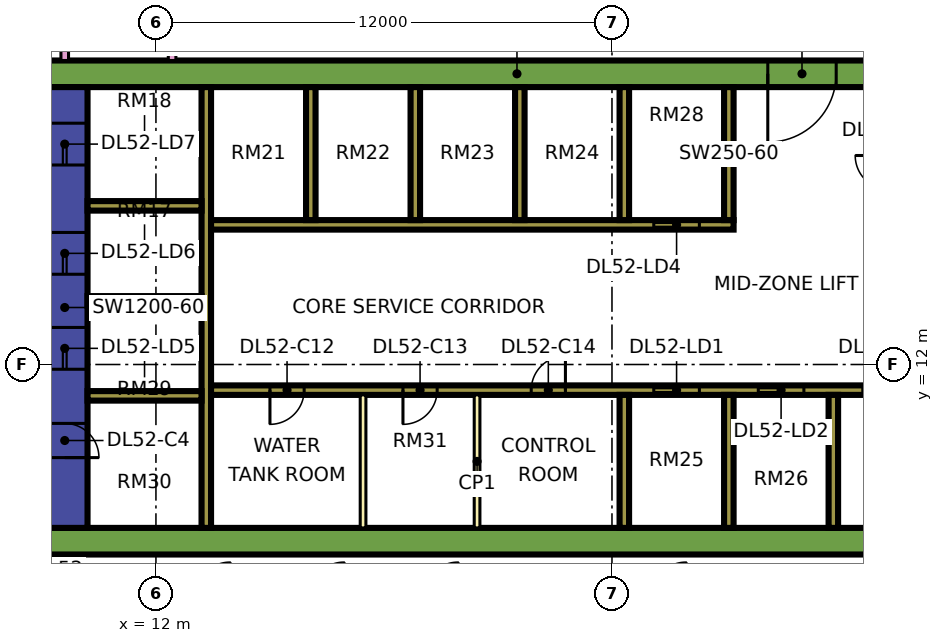
"""IFC4 building model, lengths in metres.
Left out: names, types, materials, properties, quantities, classifications, styles, units other than length and angle.
Written with IfcOpenShell. Run it as: python <this file> out.ifc"""

import sys

from ifc_helpers import new_model, si_unit, direction, frame, frame_2d, origin, place, context, subcontext, project, spatial, rectangle, extrude, element, fill, save


model = new_model("IFC4")
c1 = context("Model", 3, precision=1e-05, world=origin(), true_north=direction((0.0, 1.0)))
c2 = subcontext(c1, "Body", "Model", "MODEL_VIEW")
j1 = project(units=[si_unit("LENGTHUNIT", "METRE"), si_unit("PLANEANGLEUNIT", "RADIAN")], contexts=[c1])
p1 = place(None, origin())
s1 = spatial("IfcSite", under=j1, at=p1, CompositionType="ELEMENT")
p2 = place(p1, origin())
s2 = spatial("IfcBuilding", under=s1, at=p2, CompositionType="ELEMENT")
p3 = place(p2, frame((0.0, 0.0, 222.9)))
s3 = spatial("IfcBuildingStorey", under=s2, at=p3, CompositionType="ELEMENT", Elevation=222.9)
p4 = place(p3, frame((9.0, 7.35, 0.0), z_axis=(0.0, 0.0, 1.0), x_axis=(1.0, 0.0, 0.0)))
e1 = element("IfcWall", 1, at=p4, inside=s3, PredefinedType="SHEAR", context=c2, shape_type="SweptSolid", body=[
    extrude(rectangle(XDim=25.0, YDim=0.7, at=frame_2d((12.5, 0.0))), origin(), (0.0, 0.0, 1.0), 3.75),
])
p5 = place(p3, frame((9.0, 19.65, 0.0), z_axis=(0.0, 0.0, 1.0), x_axis=(1.0, 0.0, 0.0)))
e2 = element("IfcWall", 2, at=p5, inside=s3, PredefinedType="SHEAR", context=c2, shape_type="SweptSolid", body=[
    extrude(rectangle(XDim=25.0, YDim=0.7, at=frame_2d((12.5, 0.0))), origin(), (0.0, 0.0, 1.0), 3.75),
])
p6 = place(p5, frame((19.1, 0.0, 0.0)))
e3 = element("IfcOpeningElement", 3, at=p6, cuts=e2, PredefinedType="OPENING", context=c2, shape_type="SweptSolid", body=[
    extrude(rectangle(XDim=1.8, YDim=2.4, at=frame_2d((0.9, 1.2))), frame((0.0, 0.36, 0.0), z_axis=(0.0, -1.0, 0.0), x_axis=(1.0, 0.0, 0.0)), (0.0, 0.0, 1.0), 0.72),
])
p7 = place(p3, frame((9.6, 7.7, 0.0), z_axis=(0.0, 0.0, 1.0), x_axis=(0.0, 1.0, 0.0)))
e4 = element("IfcWall", 4, at=p7, inside=s3, PredefinedType="SHEAR", context=c2, shape_type="SweptSolid", body=[
    extrude(rectangle(XDim=11.6, YDim=1.2, at=frame_2d((5.8, 0.0))), origin(), (0.0, 0.0, 1.0), 3.75),
])
p8 = place(p7, frame((4.175, 0.0, 0.0)))
e5 = element("IfcOpeningElement", 5, at=p8, cuts=e4, PredefinedType="OPENING", context=c2, shape_type="SweptSolid", body=[
    extrude(rectangle(XDim=1.1, YDim=2.2, at=frame_2d((0.55, 1.1))), frame((0.0, 0.61, 0.0), z_axis=(0.0, -1.0, 0.0), x_axis=(1.0, 0.0, 0.0)), (0.0, 0.0, 1.0), 1.22),
])
p9 = place(p7, frame((6.675, 0.0, 0.0)))
e6 = element("IfcOpeningElement", 6, at=p9, cuts=e4, PredefinedType="OPENING", context=c2, shape_type="SweptSolid", body=[
    extrude(rectangle(XDim=1.1, YDim=2.2, at=frame_2d((0.55, 1.1))), frame((0.0, 0.61, 0.0), z_axis=(0.0, -1.0, 0.0), x_axis=(1.0, 0.0, 0.0)), (0.0, 0.0, 1.0), 1.22),
])
p10 = place(p7, frame((9.55, 0.0, 0.0)))
e7 = element("IfcOpeningElement", 7, at=p10, cuts=e4, PredefinedType="OPENING", context=c2, shape_type="SweptSolid", body=[
    extrude(rectangle(XDim=1.1, YDim=2.2, at=frame_2d((0.55, 1.1))), frame((0.0, 0.61, 0.0), z_axis=(0.0, -1.0, 0.0), x_axis=(1.0, 0.0, 0.0)), (0.0, 0.0, 1.0), 1.22),
])
p11 = place(p7, frame((1.85, 0.0, 0.0)))
e8 = element("IfcOpeningElement", 8, at=p11, cuts=e4, PredefinedType="OPENING", context=c2, shape_type="SweptSolid", body=[
    extrude(rectangle(XDim=0.9, YDim=2.1, at=frame_2d((0.45, 1.05))), frame((0.0, 0.61, 0.0), z_axis=(0.0, -1.0, 0.0), x_axis=(1.0, 0.0, 0.0)), (0.0, 0.0, 1.0), 1.22),
])
p12 = place(p3, frame((13.325, 7.7, 0.0), z_axis=(0.0, 0.0, 1.0), x_axis=(0.0, 1.0, 0.0)))
e9 = element("IfcWall", 9, at=p12, inside=s3, PredefinedType="SHEAR", context=c2, shape_type="SweptSolid", body=[
    extrude(rectangle(XDim=11.6, YDim=0.25, at=frame_2d((5.8, 0.0))), origin(), (0.0, 0.0, 1.0), 3.75),
])
p13 = place(p3, frame((13.45, 11.325, 0.0), z_axis=(0.0, 0.0, 1.0), x_axis=(1.0, 0.0, 0.0)))
e10 = element("IfcWall", 10, at=p13, inside=s3, PredefinedType="SHEAR", context=c2, shape_type="SweptSolid", body=[
    extrude(rectangle(XDim=19.85, YDim=0.25, at=frame_2d((9.925, 0.0))), origin(), (0.0, 0.0, 1.0), 3.75),
])
p14 = place(p13, frame((11.65, 0.0, 0.0)))
e11 = element("IfcOpeningElement", 11, at=p14, cuts=e10, PredefinedType="OPENING", context=c2, shape_type="SweptSolid", body=[
    extrude(rectangle(XDim=1.2, YDim=2.2, at=frame_2d((0.6, 1.1))), frame((0.0, 0.135, 0.0), z_axis=(0.0, -1.0, 0.0), x_axis=(1.0, 0.0, 0.0)), (0.0, 0.0, 1.0), 0.27),
])
p15 = place(p13, frame((14.4, 0.0, 0.0)))
e12 = element("IfcOpeningElement", 12, at=p15, cuts=e10, PredefinedType="OPENING", context=c2, shape_type="SweptSolid", body=[
    extrude(rectangle(XDim=1.2, YDim=2.2, at=frame_2d((0.6, 1.1))), frame((0.0, 0.135, 0.0), z_axis=(0.0, -1.0, 0.0), x_axis=(1.0, 0.0, 0.0)), (0.0, 0.0, 1.0), 0.27),
])
p16 = place(p13, frame((17.15, 0.0, 0.0)))
e13 = element("IfcOpeningElement", 13, at=p16, cuts=e10, PredefinedType="OPENING", context=c2, shape_type="SweptSolid", body=[
    extrude(rectangle(XDim=1.2, YDim=2.2, at=frame_2d((0.6, 1.1))), frame((0.0, 0.135, 0.0), z_axis=(0.0, -1.0, 0.0), x_axis=(1.0, 0.0, 0.0)), (0.0, 0.0, 1.0), 0.27),
])
p17 = place(p13, frame((1.55, 0.0, 0.0)))
e14 = element("IfcOpeningElement", 14, at=p17, cuts=e10, PredefinedType="OPENING", context=c2, shape_type="SweptSolid", body=[
    extrude(rectangle(XDim=0.9, YDim=2.1, at=frame_2d((0.45, 1.05))), frame((0.0, 0.135, 0.0), z_axis=(0.0, -1.0, 0.0), x_axis=(1.0, 0.0, 0.0)), (0.0, 0.0, 1.0), 0.27),
])
p18 = place(p13, frame((5.05, 0.0, 0.0)))
e15 = element("IfcOpeningElement", 15, at=p18, cuts=e10, PredefinedType="OPENING", context=c2, shape_type="SweptSolid", body=[
    extrude(rectangle(XDim=0.9, YDim=2.1, at=frame_2d((0.45, 1.05))), frame((0.0, 0.135, 0.0), z_axis=(0.0, -1.0, 0.0), x_axis=(1.0, 0.0, 0.0)), (0.0, 0.0, 1.0), 0.27),
])
p19 = place(p13, frame((8.425, 0.0, 0.0)))
e16 = element("IfcOpeningElement", 16, at=p19, cuts=e10, PredefinedType="OPENING", context=c2, shape_type="SweptSolid", body=[
    extrude(rectangle(XDim=0.9, YDim=2.1, at=frame_2d((0.45, 1.05))), frame((0.0, 0.135, 0.0), z_axis=(0.0, -1.0, 0.0), x_axis=(1.0, 0.0, 0.0)), (0.0, 0.0, 1.0), 0.27),
])
p20 = place(p3, frame((13.45, 15.675, 0.0), z_axis=(0.0, 0.0, 1.0), x_axis=(1.0, 0.0, 0.0)))
e17 = element("IfcWall", 17, at=p20, inside=s3, PredefinedType="SHEAR", context=c2, shape_type="SweptSolid", body=[
    extrude(rectangle(XDim=13.75, YDim=0.25, at=frame_2d((6.875, 0.0))), origin(), (0.0, 0.0, 1.0), 3.75),
])
p21 = place(p20, frame((11.65, 0.0, 0.0)))
e18 = element("IfcOpeningElement", 18, at=p21, cuts=e17, PredefinedType="OPENING", context=c2, shape_type="SweptSolid", body=[
    extrude(rectangle(XDim=1.2, YDim=2.2, at=frame_2d((0.6, 1.1))), frame((0.0, 0.135, 0.0), z_axis=(0.0, -1.0, 0.0), x_axis=(1.0, 0.0, 0.0)), (0.0, 0.0, 1.0), 0.27),
])
for number, where, z_axis, x_axis in (
    (19, (10.2, 11.175, 0.0), (0.0, 0.0, 1.0), (1.0, 0.0, 0.0)),
    (20, (10.2, 13.675, 0.0), (0.0, 0.0, 1.0), (1.0, 0.0, 0.0)),
    (21, (10.2, 16.175, 0.0), (0.0, 0.0, 1.0), (1.0, 0.0, 0.0)),
):
    element("IfcWall", number, at=place(p3, frame(where, z_axis=z_axis, x_axis=x_axis)), inside=s3, PredefinedType="SHEAR", context=c2, shape_type="SweptSolid", body=[
        extrude(rectangle(XDim=3.0, YDim=0.25, at=frame_2d((1.5, 0.0))), origin(), (0.0, 0.0, 1.0), 3.75),
    ])
for number, where, z_axis, x_axis in (
    (22, (24.325, 7.7, 0.0), (0.0, 0.0, 1.0), (0.0, 1.0, 0.0)),
    (23, (27.075, 7.7, 0.0), (0.0, 0.0, 1.0), (0.0, 1.0, 0.0)),
    (24, (29.825, 7.7, 0.0), (0.0, 0.0, 1.0), (0.0, 1.0, 0.0)),
    (25, (16.075, 15.8, 0.0), (0.0, 0.0, 1.0), (0.0, 1.0, 0.0)),
    (26, (18.825, 15.8, 0.0), (0.0, 0.0, 1.0), (0.0, 1.0, 0.0)),
    (27, (21.575, 15.8, 0.0), (0.0, 0.0, 1.0), (0.0, 1.0, 0.0)),
    (28, (24.325, 15.8, 0.0), (0.0, 0.0, 1.0), (0.0, 1.0, 0.0)),
    (29, (27.075, 15.8, 0.0), (0.0, 0.0, 1.0), (0.0, 1.0, 0.0)),
):
    element("IfcWall", number, at=place(p3, frame(where, z_axis=z_axis, x_axis=x_axis)), inside=s3, PredefinedType="SHEAR", context=c2, shape_type="SweptSolid", body=[
        extrude(rectangle(XDim=3.5, YDim=0.25, at=frame_2d((1.75, 0.0))), origin(), (0.0, 0.0, 1.0), 3.75),
    ])
p22 = place(p3, frame((-1.447, 12.553, 0.0), z_axis=(0.0, 0.0, 1.0), x_axis=(0.707106781187, -0.707106781187, 0.0)))
e30 = element("IfcWall", 30, at=p22, inside=s3, PredefinedType="SOLIDWALL", context=c2, shape_type="SweptSolid", body=[
    extrude(rectangle(XDim=19.799, YDim=0.15, at=frame_2d((9.899, 0.0))), origin(), (0.0, 0.0, 1.0), 3.35),
])
p23 = place(p22, frame((2.212, 0.0, 0.45)))
e31 = element("IfcOpeningElement", 31, at=p23, cuts=e30, PredefinedType="OPENING", context=c2, shape_type="SweptSolid", body=[
    extrude(rectangle(XDim=3.0, YDim=2.4, at=frame_2d((1.5, 1.2))), frame((0.0, 0.085, 0.0), z_axis=(0.0, -1.0, 0.0), x_axis=(1.0, 0.0, 0.0)), (0.0, 0.0, 1.0), 0.17),
])
p24 = place(p22, frame((10.216, 0.0, 0.45)))
e32 = element("IfcOpeningElement", 32, at=p24, cuts=e30, PredefinedType="OPENING", context=c2, shape_type="SweptSolid", body=[
    extrude(rectangle(XDim=3.0, YDim=2.4, at=frame_2d((1.5, 1.2))), frame((0.0, 0.085, 0.0), z_axis=(0.0, -1.0, 0.0), x_axis=(1.0, 0.0, 0.0)), (0.0, 0.0, 1.0), 0.17),
])
for number, where, z_axis, x_axis in (
    (33, (17.45, 7.7, 0.0), (0.0, 0.0, 1.0), (0.0, 1.0, 0.0)),
    (34, (20.45, 7.7, 0.0), (0.0, 0.0, 1.0), (0.0, 1.0, 0.0)),
):
    element("IfcWall", number, at=place(p3, frame(where, z_axis=z_axis, x_axis=x_axis)), inside=s3, PredefinedType="PARTITIONING", context=c2, shape_type="SweptSolid", body=[
        extrude(rectangle(XDim=3.5, YDim=0.15, at=frame_2d((1.75, 0.0))), origin(), (0.0, 0.0, 1.0), 3.35),
    ])
p25 = place(p3, frame((9.6, 20.0, 0.0), z_axis=(0.0, 0.0, 1.0), x_axis=(0.0, 1.0, 0.0)))
e35 = element("IfcWall", 35, at=p25, inside=s3, PredefinedType="PARTITIONING", context=c2, shape_type="SweptSolid", body=[
    extrude(rectangle(XDim=42.926, YDim=0.2, at=frame_2d((21.463, 0.0))), origin(), (0.0, 0.0, 1.0), 3.35),
])
p26 = place(p25, frame((17.1, 0.0, 0.0)))
e36 = element("IfcOpeningElement", 36, at=p26, cuts=e35, PredefinedType="OPENING", context=c2, shape_type="SweptSolid", body=[
    extrude(rectangle(XDim=1.0, YDim=2.1, at=frame_2d((0.5, 1.05))), frame((0.0, 0.11, 0.0), z_axis=(0.0, -1.0, 0.0), x_axis=(1.0, 0.0, 0.0)), (0.0, 0.0, 1.0), 0.22),
])
p27 = place(p25, frame((32.1, 0.0, 0.0)))
e37 = element("IfcOpeningElement", 37, at=p27, cuts=e35, PredefinedType="OPENING", context=c2, shape_type="SweptSolid", body=[
    extrude(rectangle(XDim=1.0, YDim=2.1, at=frame_2d((0.5, 1.05))), frame((0.0, 0.11, 0.0), z_axis=(0.0, -1.0, 0.0), x_axis=(1.0, 0.0, 0.0)), (0.0, 0.0, 1.0), 0.22),
])
p28 = place(p25, frame((0.6, 0.0, 0.0)))
e38 = element("IfcOpeningElement", 38, at=p28, cuts=e35, PredefinedType="OPENING", context=c2, shape_type="SweptSolid", body=[
    extrude(rectangle(XDim=1.2, YDim=2.1, at=frame_2d((0.6, 1.05))), frame((0.0, 0.11, 0.0), z_axis=(0.0, -1.0, 0.0), x_axis=(1.0, 0.0, 0.0)), (0.0, 0.0, 1.0), 0.22),
])
p29 = place(p25, frame((14.1, 0.0, 0.0)))
e39 = element("IfcOpeningElement", 39, at=p29, cuts=e35, PredefinedType="OPENING", context=c2, shape_type="SweptSolid", body=[
    extrude(rectangle(XDim=1.0, YDim=2.1, at=frame_2d((0.5, 1.05))), frame((0.0, 0.11, 0.0), z_axis=(0.0, -1.0, 0.0), x_axis=(1.0, 0.0, 0.0)), (0.0, 0.0, 1.0), 0.22),
])
p30 = place(p3, frame((12.425, 20.0, 0.0), z_axis=(0.0, 0.0, 1.0), x_axis=(0.0, 1.0, 0.0)))
e40 = element("IfcWall", 40, at=p30, inside=s3, PredefinedType="PARTITIONING", context=c2, shape_type="SweptSolid", body=[
    extrude(rectangle(XDim=43.0, YDim=0.2, at=frame_2d((21.5, 0.0))), origin(), (0.0, 0.0, 1.0), 3.35),
])
p31 = place(p30, frame((7.15, 0.0, 0.0)))
e41 = element("IfcOpeningElement", 41, at=p31, cuts=e40, PredefinedType="OPENING", context=c2, shape_type="SweptSolid", body=[
    extrude(rectangle(XDim=1.6, YDim=2.1, at=frame_2d((0.8, 1.05))), frame((0.0, 0.11, 0.0), z_axis=(0.0, -1.0, 0.0), x_axis=(1.0, 0.0, 0.0)), (0.0, 0.0, 1.0), 0.22),
])
p32 = place(p30, frame((13.5, 0.0, 0.0)))
e42 = element("IfcOpeningElement", 42, at=p32, cuts=e40, PredefinedType="OPENING", context=c2, shape_type="SweptSolid", body=[
    extrude(rectangle(XDim=1.0, YDim=2.1, at=frame_2d((0.5, 1.05))), frame((0.0, 0.11, 0.0), z_axis=(0.0, -1.0, 0.0), x_axis=(1.0, 0.0, 0.0)), (0.0, 0.0, 1.0), 0.22),
])
p33 = place(p30, frame((22.9, 0.0, 0.0)))
e43 = element("IfcOpeningElement", 43, at=p33, cuts=e40, PredefinedType="OPENING", context=c2, shape_type="SweptSolid", body=[
    extrude(rectangle(XDim=1.0, YDim=2.1, at=frame_2d((0.5, 1.05))), frame((0.0, 0.11, 0.0), z_axis=(0.0, -1.0, 0.0), x_axis=(1.0, 0.0, 0.0)), (0.0, 0.0, 1.0), 0.22),
])
p34 = place(p30, frame((35.35, 0.0, 0.0)))
e44 = element("IfcOpeningElement", 44, at=p34, cuts=e40, PredefinedType="OPENING", context=c2, shape_type="SweptSolid", body=[
    extrude(rectangle(XDim=1.0, YDim=2.1, at=frame_2d((0.5, 1.05))), frame((0.0, 0.11, 0.0), z_axis=(0.0, -1.0, 0.0), x_axis=(1.0, 0.0, 0.0)), (0.0, 0.0, 1.0), 0.22),
])
p35 = place(p30, frame((1.15, 0.0, 0.0)))
e45 = element("IfcOpeningElement", 45, at=p35, cuts=e40, PredefinedType="OPENING", context=c2, shape_type="SweptSolid", body=[
    extrude(rectangle(XDim=1.8, YDim=2.1, at=frame_2d((0.9, 1.05))), frame((0.0, 0.11, 0.0), z_axis=(0.0, -1.0, 0.0), x_axis=(1.0, 0.0, 0.0)), (0.0, 0.0, 1.0), 0.22),
])
p36 = place(p30, frame((28.6, 0.0, 0.0)))
e46 = element("IfcOpeningElement", 46, at=p36, cuts=e40, PredefinedType="OPENING", context=c2, shape_type="SweptSolid", body=[
    extrude(rectangle(XDim=1.8, YDim=2.1, at=frame_2d((0.9, 1.05))), frame((0.0, 0.11, 0.0), z_axis=(0.0, -1.0, 0.0), x_axis=(1.0, 0.0, 0.0)), (0.0, 0.0, 1.0), 0.22),
])
p37 = place(p14, origin())
e47 = element("IfcDoor", 47, at=p37, inside=s3, OperationType="DOUBLE_DOOR_SLIDING", PredefinedType="DOOR", context=c2, shape_type="SweptSolid", body=[
    extrude(rectangle(XDim=1.2, YDim=2.2, at=frame_2d((0.6, 1.1))), frame((0.0, 0.025, 0.0), z_axis=(0.0, -1.0, 0.0), x_axis=(1.0, 0.0, 0.0)), (0.0, 0.0, 1.0), 0.05),
])
fill(e11, e47)
p38 = place(p15, origin())
e48 = element("IfcDoor", 48, at=p38, inside=s3, OperationType="DOUBLE_DOOR_SLIDING", PredefinedType="DOOR", context=c2, shape_type="SweptSolid", body=[
    extrude(rectangle(XDim=1.2, YDim=2.2, at=frame_2d((0.6, 1.1))), frame((0.0, 0.025, 0.0), z_axis=(0.0, -1.0, 0.0), x_axis=(1.0, 0.0, 0.0)), (0.0, 0.0, 1.0), 0.05),
])
fill(e12, e48)
p39 = place(p16, origin())
e49 = element("IfcDoor", 49, at=p39, inside=s3, OperationType="DOUBLE_DOOR_SLIDING", PredefinedType="DOOR", context=c2, shape_type="SweptSolid", body=[
    extrude(rectangle(XDim=1.2, YDim=2.2, at=frame_2d((0.6, 1.1))), frame((0.0, 0.025, 0.0), z_axis=(0.0, -1.0, 0.0), x_axis=(1.0, 0.0, 0.0)), (0.0, 0.0, 1.0), 0.05),
])
fill(e13, e49)
p40 = place(p21, origin())
e50 = element("IfcDoor", 50, at=p40, inside=s3, OperationType="DOUBLE_DOOR_SLIDING", PredefinedType="DOOR", context=c2, shape_type="SweptSolid", body=[
    extrude(rectangle(XDim=1.2, YDim=2.2, at=frame_2d((0.6, 1.1))), frame((0.0, 0.025, 0.0), z_axis=(0.0, -1.0, 0.0), x_axis=(1.0, 0.0, 0.0)), (0.0, 0.0, 1.0), 0.05),
])
fill(e18, e50)
p41 = place(p8, origin())
e51 = element("IfcDoor", 51, at=p41, inside=s3, OperationType="DOUBLE_DOOR_SLIDING", PredefinedType="DOOR", context=c2, shape_type="SweptSolid", body=[
    extrude(rectangle(XDim=1.1, YDim=2.2, at=frame_2d((0.55, 1.1))), frame((0.0, 0.025, 0.0), z_axis=(0.0, -1.0, 0.0), x_axis=(1.0, 0.0, 0.0)), (0.0, 0.0, 1.0), 0.05),
])
fill(e5, e51)
p42 = place(p9, origin())
e52 = element("IfcDoor", 52, at=p42, inside=s3, OperationType="DOUBLE_DOOR_SLIDING", PredefinedType="DOOR", context=c2, shape_type="SweptSolid", body=[
    extrude(rectangle(XDim=1.1, YDim=2.2, at=frame_2d((0.55, 1.1))), frame((0.0, 0.025, 0.0), z_axis=(0.0, -1.0, 0.0), x_axis=(1.0, 0.0, 0.0)), (0.0, 0.0, 1.0), 0.05),
])
fill(e6, e52)
p43 = place(p10, origin())
e53 = element("IfcDoor", 53, at=p43, inside=s3, OperationType="DOUBLE_DOOR_SLIDING", PredefinedType="DOOR", context=c2, shape_type="SweptSolid", body=[
    extrude(rectangle(XDim=1.1, YDim=2.2, at=frame_2d((0.55, 1.1))), frame((0.0, 0.025, 0.0), z_axis=(0.0, -1.0, 0.0), x_axis=(1.0, 0.0, 0.0)), (0.0, 0.0, 1.0), 0.05),
])
fill(e7, e53)
p44 = place(p6, frame((1.8, 0.0, 0.0), z_axis=(0.0, 0.0, 1.0), x_axis=(-1.0, 0.0, 0.0)))
e54 = element("IfcDoor", 54, at=p44, inside=s3, OperationType="DOUBLE_DOOR_SINGLE_SWING", PredefinedType="DOOR", context=c2, shape_type="SweptSolid", body=[
    extrude(rectangle(XDim=1.8, YDim=2.4, at=frame_2d((0.9, 1.2))), frame((0.0, 0.025, 0.0), z_axis=(0.0, -1.0, 0.0), x_axis=(1.0, 0.0, 0.0)), (0.0, 0.0, 1.0), 0.05),
])
fill(e3, e54)
p45 = place(p11, frame((0.9, 0.0, 0.0), z_axis=(0.0, 0.0, 1.0), x_axis=(-1.0, 0.0, 0.0)))
e55 = element("IfcDoor", 55, at=p45, inside=s3, OperationType="SINGLE_SWING_LEFT", PredefinedType="DOOR", context=c2, shape_type="SweptSolid", body=[
    extrude(rectangle(XDim=0.9, YDim=2.1, at=frame_2d((0.45, 1.05))), frame((0.0, 0.025, 0.0), z_axis=(0.0, -1.0, 0.0), x_axis=(1.0, 0.0, 0.0)), (0.0, 0.0, 1.0), 0.05),
])
fill(e8, e55)
p46 = place(p17, frame((0.9, 0.0, 0.0), z_axis=(0.0, 0.0, 1.0), x_axis=(-1.0, 0.0, 0.0)))
e56 = element("IfcDoor", 56, at=p46, inside=s3, OperationType="SINGLE_SWING_LEFT", PredefinedType="DOOR", context=c2, shape_type="SweptSolid", body=[
    extrude(rectangle(XDim=0.9, YDim=2.1, at=frame_2d((0.45, 1.05))), frame((0.0, 0.025, 0.0), z_axis=(0.0, -1.0, 0.0), x_axis=(1.0, 0.0, 0.0)), (0.0, 0.0, 1.0), 0.05),
])
fill(e14, e56)
p47 = place(p18, frame((0.9, 0.0, 0.0), z_axis=(0.0, 0.0, 1.0), x_axis=(-1.0, 0.0, 0.0)))
e57 = element("IfcDoor", 57, at=p47, inside=s3, OperationType="SINGLE_SWING_LEFT", PredefinedType="DOOR", context=c2, shape_type="SweptSolid", body=[
    extrude(rectangle(XDim=0.9, YDim=2.1, at=frame_2d((0.45, 1.05))), frame((0.0, 0.025, 0.0), z_axis=(0.0, -1.0, 0.0), x_axis=(1.0, 0.0, 0.0)), (0.0, 0.0, 1.0), 0.05),
])
fill(e15, e57)
p48 = place(p19, frame((0.9, 0.0, 0.0), z_axis=(0.0, 0.0, 1.0), x_axis=(-1.0, 0.0, 0.0)))
e58 = element("IfcDoor", 58, at=p48, inside=s3, OperationType="SINGLE_SWING_RIGHT", PredefinedType="DOOR", context=c2, shape_type="SweptSolid", body=[
    extrude(rectangle(XDim=0.9, YDim=2.1, at=frame_2d((0.45, 1.05))), frame((0.0, 0.025, 0.0), z_axis=(0.0, -1.0, 0.0), x_axis=(1.0, 0.0, 0.0)), (0.0, 0.0, 1.0), 0.05),
])
fill(e16, e58)
save(model, sys.argv[1])
